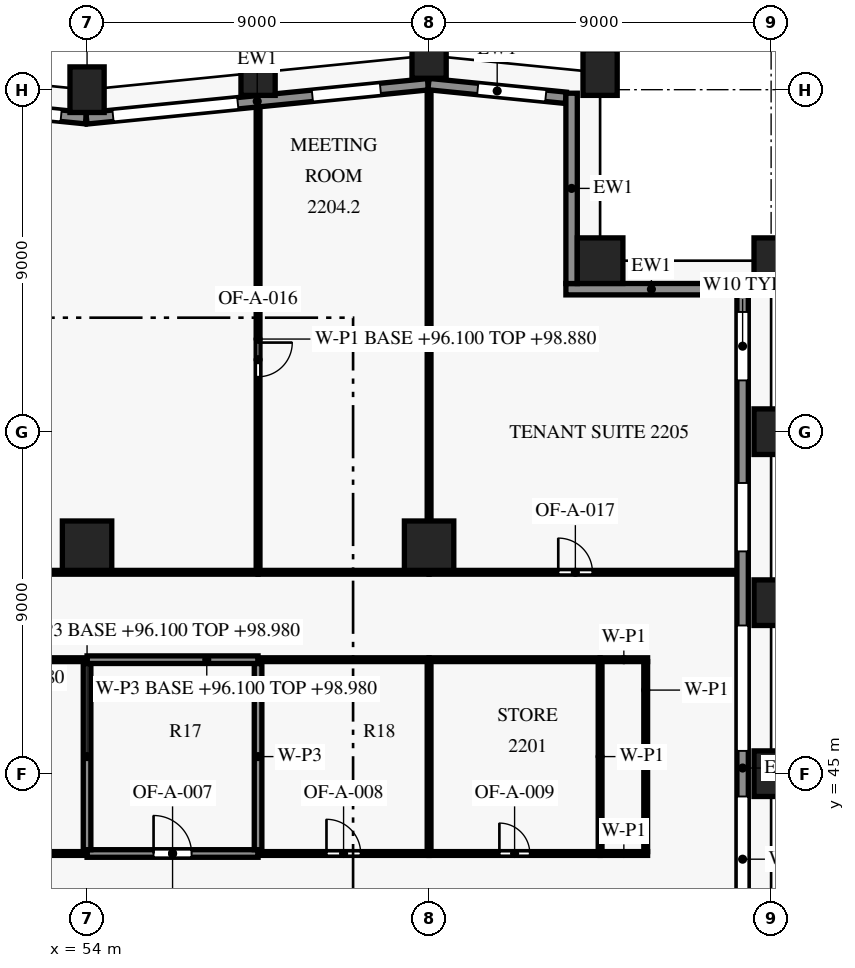
"""IFC4 building model, lengths in metres.
Left out: names, types, materials, properties, quantities, classifications, styles, units other than length and angle.
Written with IfcOpenShell. Run it as: python <this file> out.ifc"""

import sys

from ifc_helpers import new_model, si_unit, direction, frame, frame_2d, origin, origin_2d, place, context, subcontext, project, spatial, rectangle, extrude, element, fill, save


model = new_model("IFC4")
c1 = context("Model", 3, precision=1e-05, world=origin(), true_north=direction((0.0, 1.0)))
c2 = subcontext(c1, "Body", "Model", "MODEL_VIEW")
j1 = project(units=[si_unit("LENGTHUNIT", "METRE"), si_unit("PLANEANGLEUNIT", "RADIAN")], contexts=[c1])
p1 = place(None, origin())
s1 = spatial("IfcSite", under=j1, at=p1, CompositionType="ELEMENT")
p2 = place(p1, origin())
s2 = spatial("IfcBuilding", under=s1, at=p2, CompositionType="ELEMENT")
p3 = place(p2, frame((0.0, 0.0, 96.1)))
s3 = spatial("IfcBuildingStorey", under=s2, at=p3, CompositionType="ELEMENT", Elevation=96.1)
for number, where, z_axis, x_axis in (
    (1, (72.0, 45.0, 0.0), (0.0, 0.0, 1.0), (0.0, 1.0, 0.0)),
    (2, (72.0, 49.5, 0.0), (0.0, 0.0, 1.0), (0.0, 1.0, 0.0)),
    (3, (72.0, 54.0, 0.0), (0.0, 0.0, 1.0), (0.0, 1.0, 0.0)),
    (4, (72.0, 58.5, 0.0), (0.0, 0.0, 1.0), (0.0, 1.0, 0.0)),
    (5, (67.5, 63.45, 0.0), (0.0, 0.0, 1.0), (-0.995, 0.1, 0.0)),
    (6, (63.0, 63.9, 0.0), (0.0, 0.0, 1.0), (-1.0, 0.0, 0.0)),
    (7, (58.5, 63.45, 0.0), (0.0, 0.0, 1.0), (-0.995, -0.1, 0.0)),
    (8, (54.0, 63.0, 0.0), (0.0, 0.0, 1.0), (-1.0, 0.0, 0.0)),
):
    element("IfcColumn", number, at=place(p3, frame(where, z_axis=z_axis, x_axis=x_axis)), inside=s3, PredefinedType="COLUMN", context=c2, shape_type="SweptSolid", body=[
        extrude(rectangle(XDim=0.9, YDim=1.2, at=origin_2d()), origin(), (0.0, 0.0, 1.0), 3.8),
    ])
p4 = place(p3, frame((67.5, 58.5, 0.0), z_axis=(0.0, 0.0, 1.0), x_axis=(1.0, 0.0, 0.0)))
e9 = element("IfcColumn", 9, at=p4, inside=s3, PredefinedType="COLUMN", context=c2, shape_type="SweptSolid", body=[
    extrude(rectangle(XDim=1.2, YDim=1.2, at=origin_2d()), origin(), (0.0, 0.0, 1.0), 3.8),
])
for number, where, z_axis, x_axis in (
    (10, (54.0, 51.0, 0.0), (0.0, 0.0, 1.0), (1.0, 0.0, 0.0)),
    (11, (63.0, 51.0, 0.0), (0.0, 0.0, 1.0), (1.0, 0.0, 0.0)),
):
    element("IfcColumn", number, at=place(p3, frame(where, z_axis=z_axis, x_axis=x_axis)), inside=s3, PredefinedType="COLUMN", context=c2, shape_type="SweptSolid", body=[
        extrude(rectangle(XDim=1.3, YDim=1.3, at=origin_2d()), origin(), (0.0, 0.0, 1.0), 3.8),
    ])
p5 = place(p3, frame((71.25, 57.9, 0.0), z_axis=(0.0, 0.0, 1.0), x_axis=(0.0, -1.0, 0.0)))
e12 = element("IfcWall", 12, at=p5, inside=s3, PredefinedType="SOLIDWALL", context=c2, shape_type="SweptSolid", body=[
    extrude(rectangle(XDim=25.502, YDim=0.3, at=frame_2d((12.751, 0.0))), origin(), (0.0, 0.0, 1.0), 3.15),
])
p6 = place(p5, frame((0.75, 0.0, 0.75)))
e13 = element("IfcOpeningElement", 13, at=p6, cuts=e12, PredefinedType="OPENING", context=c2, shape_type="SweptSolid", body=[
    extrude(rectangle(XDim=1.8, YDim=1.8, at=frame_2d((0.9, 0.9))), frame((0.0, 0.16, 0.0), z_axis=(0.0, -1.0, 0.0), x_axis=(1.0, 0.0, 0.0)), (0.0, 0.0, 1.0), 0.32),
])
p7 = place(p5, frame((5.25, 0.0, 0.75)))
e14 = element("IfcOpeningElement", 14, at=p7, cuts=e12, PredefinedType="OPENING", context=c2, shape_type="SweptSolid", body=[
    extrude(rectangle(XDim=1.8, YDim=1.8, at=frame_2d((0.9, 0.9))), frame((0.0, 0.16, 0.0), z_axis=(0.0, -1.0, 0.0), x_axis=(1.0, 0.0, 0.0)), (0.0, 0.0, 1.0), 0.32),
])
p8 = place(p5, frame((9.0, 0.0, 0.15)))
e15 = element("IfcOpeningElement", 15, at=p8, cuts=e12, PredefinedType="OPENING", context=c2, shape_type="SweptSolid", body=[
    extrude(rectangle(XDim=3.3, YDim=2.4, at=frame_2d((1.65, 1.2))), frame((0.0, 0.16, 0.0), z_axis=(0.0, -1.0, 0.0), x_axis=(1.0, 0.0, 0.0)), (0.0, 0.0, 1.0), 0.32),
])
p9 = place(p5, frame((13.5, 0.0, 0.15)))
e16 = element("IfcOpeningElement", 16, at=p9, cuts=e12, PredefinedType="OPENING", context=c2, shape_type="SweptSolid", body=[
    extrude(rectangle(XDim=3.3, YDim=2.4, at=frame_2d((1.65, 1.2))), frame((0.0, 0.16, 0.0), z_axis=(0.0, -1.0, 0.0), x_axis=(1.0, 0.0, 0.0)), (0.0, 0.0, 1.0), 0.32),
])
p10 = place(p5, frame((18.75, 0.0, 0.75)))
e17 = element("IfcOpeningElement", 17, at=p10, cuts=e12, PredefinedType="OPENING", context=c2, shape_type="SweptSolid", body=[
    extrude(rectangle(XDim=1.8, YDim=1.8, at=frame_2d((0.9, 0.9))), frame((0.0, 0.16, 0.0), z_axis=(0.0, -1.0, 0.0), x_axis=(1.0, 0.0, 0.0)), (0.0, 0.0, 1.0), 0.32),
])
p11 = place(p5, frame((23.25, 0.0, 0.75)))
e18 = element("IfcOpeningElement", 18, at=p11, cuts=e12, PredefinedType="OPENING", context=c2, shape_type="SweptSolid", body=[
    extrude(rectangle(XDim=1.8, YDim=1.8, at=frame_2d((0.9, 0.9))), frame((0.0, 0.16, 0.0), z_axis=(0.0, -1.0, 0.0), x_axis=(1.0, 0.0, 0.0)), (0.0, 0.0, 1.0), 0.32),
])
p12 = place(p3, frame((66.6, 57.75, 0.0), z_axis=(0.0, 0.0, 1.0), x_axis=(1.0, 0.0, 0.0)))
e19 = element("IfcWall", 19, at=p12, inside=s3, PredefinedType="SOLIDWALL", context=c2, shape_type="SweptSolid", body=[
    extrude(rectangle(XDim=4.5, YDim=0.3, at=frame_2d((2.25, 0.0))), origin(), (0.0, 0.0, 1.0), 3.15),
])
p13 = place(p3, frame((66.75, 62.907, 0.0), z_axis=(0.0, 0.0, 1.0), x_axis=(0.0, -1.0, 0.0)))
e20 = element("IfcWall", 20, at=p13, inside=s3, PredefinedType="SOLIDWALL", context=c2, shape_type="SweptSolid", body=[
    extrude(rectangle(XDim=5.009, YDim=0.3, at=frame_2d((2.504, 0.0))), origin(), (0.0, 0.0, 1.0), 3.15),
])
p14 = place(p3, frame((62.985, 63.148, 0.0), z_axis=(0.0, 0.0, 1.0), x_axis=(0.995038521274, -0.099490407478, 0.0)))
e21 = element("IfcWall", 21, at=p14, inside=s3, PredefinedType="SOLIDWALL", context=c2, shape_type="SweptSolid", body=[
    extrude(rectangle(XDim=3.632, YDim=0.3, at=frame_2d((1.816, 0.0))), origin(), (0.0, 0.0, 1.0), 3.15),
])
p15 = place(p14, frame((1.301, 0.0, 0.75)))
e22 = element("IfcOpeningElement", 22, at=p15, cuts=e21, PredefinedType="OPENING", context=c2, shape_type="SweptSolid", body=[
    extrude(rectangle(XDim=1.8, YDim=1.8, at=frame_2d((0.9, 0.9))), frame((0.0, 0.16, 0.0), z_axis=(0.0, -1.0, 0.0), x_axis=(1.0, 0.0, 0.0)), (0.0, 0.0, 1.0), 0.32),
])
p16 = place(p3, frame((53.985, 62.245, 0.0), z_axis=(0.0, 0.0, 1.0), x_axis=(0.995037993253, 0.099495688264, 0.0)))
e23 = element("IfcWall", 23, at=p16, inside=s3, PredefinedType="SOLIDWALL", context=c2, shape_type="SweptSolid", body=[
    extrude(rectangle(XDim=9.03, YDim=0.3, at=frame_2d((4.515, 0.0))), origin(), (0.0, 0.0, 1.0), 3.15),
])
p17 = place(p16, frame((0.701, 0.0, 0.15)))
e24 = element("IfcOpeningElement", 24, at=p17, cuts=e23, PredefinedType="OPENING", context=c2, shape_type="SweptSolid", body=[
    extrude(rectangle(XDim=3.3, YDim=2.4, at=frame_2d((1.65, 1.2))), frame((0.0, 0.16, 0.0), z_axis=(0.0, -1.0, 0.0), x_axis=(1.0, 0.0, 0.0)), (0.0, 0.0, 1.0), 0.32),
])
p18 = place(p16, frame((5.974, 0.0, 0.75)))
e25 = element("IfcOpeningElement", 25, at=p18, cuts=e23, PredefinedType="OPENING", context=c2, shape_type="SweptSolid", body=[
    extrude(rectangle(XDim=1.8, YDim=1.8, at=frame_2d((0.9, 0.9))), frame((0.0, 0.16, 0.0), z_axis=(0.0, -1.0, 0.0), x_axis=(1.0, 0.0, 0.0)), (0.0, 0.0, 1.0), 0.32),
])
p19 = place(p3, frame((44.985, 63.148, 0.0), z_axis=(0.0, 0.0, 1.0), x_axis=(0.995037993253, -0.099495688264, 0.0)))
e26 = element("IfcWall", 26, at=p19, inside=s3, PredefinedType="SOLIDWALL", context=c2, shape_type="SweptSolid", body=[
    extrude(rectangle(XDim=9.03, YDim=0.3, at=frame_2d((4.515, 0.0))), origin(), (0.0, 0.0, 1.0), 3.15),
])
p20 = place(p19, frame((1.301, 0.0, 0.75)))
e27 = element("IfcOpeningElement", 27, at=p20, cuts=e26, PredefinedType="OPENING", context=c2, shape_type="SweptSolid", body=[
    extrude(rectangle(XDim=1.8, YDim=1.8, at=frame_2d((0.9, 0.9))), frame((0.0, 0.16, 0.0), z_axis=(0.0, -1.0, 0.0), x_axis=(1.0, 0.0, 0.0)), (0.0, 0.0, 1.0), 0.32),
])
p21 = place(p19, frame((5.073, 0.0, 0.15)))
e28 = element("IfcOpeningElement", 28, at=p21, cuts=e26, PredefinedType="OPENING", context=c2, shape_type="SweptSolid", body=[
    extrude(rectangle(XDim=3.3, YDim=2.4, at=frame_2d((1.65, 1.2))), frame((0.0, 0.16, 0.0), z_axis=(0.0, -1.0, 0.0), x_axis=(1.0, 0.0, 0.0)), (0.0, 0.0, 1.0), 0.32),
])
p22 = place(p3, frame((51.3, 42.9, 0.0), z_axis=(0.0, 0.0, 1.0), x_axis=(1.0, 0.0, 0.0)))
e29 = element("IfcWall", 29, at=p22, inside=s3, PredefinedType="PARTITIONING", context=c2, shape_type="SweptSolid", body=[
    extrude(rectangle(XDim=2.7, YDim=0.1, at=frame_2d((1.35, 0.0))), origin(), (0.0, 0.0, 1.0), 2.78),
])
p23 = place(p3, frame((54.0, 42.9, 0.0), z_axis=(0.0, 0.0, 1.0), x_axis=(1.0, 0.0, 0.0)))
e30 = element("IfcWall", 30, at=p23, inside=s3, PredefinedType="PARTITIONING", context=c2, shape_type="SweptSolid", body=[
    extrude(rectangle(XDim=4.5, YDim=0.2, at=frame_2d((2.25, 0.0))), origin(), (0.0, 0.0, 1.0), 2.88),
])
p24 = place(p23, frame((1.75, 0.0, 0.0)))
e31 = element("IfcOpeningElement", 31, at=p24, cuts=e30, PredefinedType="OPENING", context=c2, shape_type="SweptSolid", body=[
    extrude(rectangle(XDim=1.0, YDim=2.1, at=frame_2d((0.5, 1.05))), frame((0.0, 0.11, 0.0), z_axis=(0.0, -1.0, 0.0), x_axis=(1.0, 0.0, 0.0)), (0.0, 0.0, 1.0), 0.22),
])
p25 = place(p3, frame((58.5, 42.9, 0.0), z_axis=(0.0, 0.0, 1.0), x_axis=(1.0, 0.0, 0.0)))
e32 = element("IfcWall", 32, at=p25, inside=s3, PredefinedType="PARTITIONING", context=c2, shape_type="SweptSolid", body=[
    extrude(rectangle(XDim=4.5, YDim=0.1, at=frame_2d((2.25, 0.0))), origin(), (0.0, 0.0, 1.0), 2.88),
])
p26 = place(p25, frame((1.8, 0.0, 0.0)))
e33 = element("IfcOpeningElement", 33, at=p26, cuts=e32, PredefinedType="OPENING", context=c2, shape_type="SweptSolid", body=[
    extrude(rectangle(XDim=0.9, YDim=2.1, at=frame_2d((0.45, 1.05))), frame((0.0, 0.06, 0.0), z_axis=(0.0, -1.0, 0.0), x_axis=(1.0, 0.0, 0.0)), (0.0, 0.0, 1.0), 0.12),
])
p27 = place(p3, frame((63.0, 42.9, 0.0), z_axis=(0.0, 0.0, 1.0), x_axis=(1.0, 0.0, 0.0)))
e34 = element("IfcWall", 34, at=p27, inside=s3, PredefinedType="PARTITIONING", context=c2, shape_type="SweptSolid", body=[
    extrude(rectangle(XDim=4.5, YDim=0.1, at=frame_2d((2.25, 0.0))), origin(), (0.0, 0.0, 1.0), 2.88),
])
p28 = place(p27, frame((1.85, 0.0, 0.0)))
e35 = element("IfcOpeningElement", 35, at=p28, cuts=e34, PredefinedType="OPENING", context=c2, shape_type="SweptSolid", body=[
    extrude(rectangle(XDim=0.8, YDim=2.1, at=frame_2d((0.4, 1.05))), frame((0.0, 0.06, 0.0), z_axis=(0.0, -1.0, 0.0), x_axis=(1.0, 0.0, 0.0)), (0.0, 0.0, 1.0), 0.12),
])
p29 = place(p3, frame((67.5, 42.9, 0.0), z_axis=(0.0, 0.0, 1.0), x_axis=(1.0, 0.0, 0.0)))
e36 = element("IfcWall", 36, at=p29, inside=s3, PredefinedType="PARTITIONING", context=c2, shape_type="SweptSolid", body=[
    extrude(rectangle(XDim=1.25, YDim=0.1, at=frame_2d((0.625, 0.0))), origin(), (0.0, 0.0, 1.0), 3.48),
])
p30 = place(p3, frame((68.7, 42.95, 0.0), z_axis=(0.0, 0.0, 1.0), x_axis=(0.0, 1.0, 0.0)))
e37 = element("IfcWall", 37, at=p30, inside=s3, PredefinedType="PARTITIONING", context=c2, shape_type="SweptSolid", body=[
    extrude(rectangle(XDim=5.0, YDim=0.1, at=frame_2d((2.5, 0.0))), origin(), (0.0, 0.0, 1.0), 3.48),
])
p31 = place(p3, frame((54.0, 43.0, 0.0), z_axis=(0.0, 0.0, 1.0), x_axis=(0.0, 1.0, 0.0)))
e38 = element("IfcWall", 38, at=p31, inside=s3, PredefinedType="PARTITIONING", context=c2, shape_type="SweptSolid", body=[
    extrude(rectangle(XDim=4.9, YDim=0.2, at=frame_2d((2.45, 0.0))), origin(), (0.0, 0.0, 1.0), 2.88),
])
p32 = place(p3, frame((58.5, 47.9, 0.0), z_axis=(0.0, 0.0, 1.0), x_axis=(0.0, -1.0, 0.0)))
e39 = element("IfcWall", 39, at=p32, inside=s3, PredefinedType="PARTITIONING", context=c2, shape_type="SweptSolid", body=[
    extrude(rectangle(XDim=4.9, YDim=0.2, at=frame_2d((2.45, 0.0))), origin(), (0.0, 0.0, 1.0), 3.48),
])
p33 = place(p3, frame((63.0, 47.95, 0.0), z_axis=(0.0, 0.0, 1.0), x_axis=(0.0, -1.0, 0.0)))
e40 = element("IfcWall", 40, at=p33, inside=s3, PredefinedType="PARTITIONING", context=c2, shape_type="SweptSolid", body=[
    extrude(rectangle(XDim=5.0, YDim=0.1, at=frame_2d((2.5, 0.0))), origin(), (0.0, 0.0, 1.0), 2.88),
])
p34 = place(p3, frame((67.5, 47.95, 0.0), z_axis=(0.0, 0.0, 1.0), x_axis=(0.0, -1.0, 0.0)))
e41 = element("IfcWall", 41, at=p34, inside=s3, PredefinedType="PARTITIONING", context=c2, shape_type="SweptSolid", body=[
    extrude(rectangle(XDim=5.0, YDim=0.1, at=frame_2d((2.5, 0.0))), origin(), (0.0, 0.0, 1.0), 3.48),
])
p35 = place(p3, frame((54.0, 48.0, 0.0), z_axis=(0.0, 0.0, 1.0), x_axis=(-1.0, 0.0, 0.0)))
e42 = element("IfcWall", 42, at=p35, inside=s3, PredefinedType="PARTITIONING", context=c2, shape_type="SweptSolid", body=[
    extrude(rectangle(XDim=9.0, YDim=0.1, at=frame_2d((4.5, 0.0))), origin(), (0.0, 0.0, 1.0), 2.88),
])
p36 = place(p3, frame((58.5, 48.0, 0.0), z_axis=(0.0, 0.0, 1.0), x_axis=(-1.0, 0.0, 0.0)))
e43 = element("IfcWall", 43, at=p36, inside=s3, PredefinedType="PARTITIONING", context=c2, shape_type="SweptSolid", body=[
    extrude(rectangle(XDim=4.5, YDim=0.2, at=frame_2d((2.25, 0.0))), origin(), (0.0, 0.0, 1.0), 2.88),
])
for number, where, z_axis, x_axis in (
    (44, (63.0, 48.0, 0.0), (0.0, 0.0, 1.0), (-1.0, 0.0, 0.0)),
    (45, (67.5, 48.0, 0.0), (0.0, 0.0, 1.0), (-1.0, 0.0, 0.0)),
):
    element("IfcWall", number, at=place(p3, frame(where, z_axis=z_axis, x_axis=x_axis)), inside=s3, PredefinedType="PARTITIONING", context=c2, shape_type="SweptSolid", body=[
        extrude(rectangle(XDim=4.5, YDim=0.1, at=frame_2d((2.25, 0.0))), origin(), (0.0, 0.0, 1.0), 2.88),
    ])
p37 = place(p3, frame((68.75, 48.0, 0.0), z_axis=(0.0, 0.0, 1.0), x_axis=(-1.0, 0.0, 0.0)))
e46 = element("IfcWall", 46, at=p37, inside=s3, PredefinedType="PARTITIONING", context=c2, shape_type="SweptSolid", body=[
    extrude(rectangle(XDim=1.25, YDim=0.1, at=frame_2d((0.625, 0.0))), origin(), (0.0, 0.0, 1.0), 3.48),
])
p38 = place(p3, frame((45.0, 50.3, 0.0), z_axis=(0.0, 0.0, 1.0), x_axis=(1.0, 0.0, 0.0)))
e47 = element("IfcWall", 47, at=p38, inside=s3, PredefinedType="PARTITIONING", context=c2, shape_type="SweptSolid", body=[
    extrude(rectangle(XDim=13.5, YDim=0.1, at=frame_2d((6.75, 0.0))), origin(), (0.0, 0.0, 1.0), 2.88),
])
p39 = place(p38, frame((4.05, 0.0, 0.0)))
e48 = element("IfcOpeningElement", 48, at=p39, cuts=e47, PredefinedType="OPENING", context=c2, shape_type="SweptSolid", body=[
    extrude(rectangle(XDim=0.9, YDim=2.1, at=frame_2d((0.45, 1.05))), frame((0.0, 0.06, 0.0), z_axis=(0.0, -1.0, 0.0), x_axis=(1.0, 0.0, 0.0)), (0.0, 0.0, 1.0), 0.12),
])
p40 = place(p3, frame((58.5, 50.3, 0.0), z_axis=(0.0, 0.0, 1.0), x_axis=(1.0, 0.0, 0.0)))
e49 = element("IfcWall", 49, at=p40, inside=s3, PredefinedType="PARTITIONING", context=c2, shape_type="SweptSolid", body=[
    extrude(rectangle(XDim=4.5, YDim=0.1, at=frame_2d((2.25, 0.0))), origin(), (0.0, 0.0, 1.0), 2.88),
])
p41 = place(p3, frame((63.0, 50.3, 0.0), z_axis=(0.0, 0.0, 1.0), x_axis=(1.0, 0.0, 0.0)))
e50 = element("IfcWall", 50, at=p41, inside=s3, PredefinedType="PARTITIONING", context=c2, shape_type="SweptSolid", body=[
    extrude(rectangle(XDim=8.08, YDim=0.1, at=frame_2d((4.04, 0.0))), origin(), (0.0, 0.0, 1.0), 2.88),
])
p42 = place(p41, frame((3.399, 0.0, 0.0)))
e51 = element("IfcOpeningElement", 51, at=p42, cuts=e50, PredefinedType="OPENING", context=c2, shape_type="SweptSolid", body=[
    extrude(rectangle(XDim=0.9, YDim=2.1, at=frame_2d((0.45, 1.05))), frame((0.0, 0.06, 0.0), z_axis=(0.0, -1.0, 0.0), x_axis=(1.0, 0.0, 0.0)), (0.0, 0.0, 1.0), 0.12),
])
p43 = place(p3, frame((58.5, 62.525, 0.0), z_axis=(0.0, 0.0, 1.0), x_axis=(0.0, -1.0, 0.0)))
e52 = element("IfcWall", 52, at=p43, inside=s3, PredefinedType="PARTITIONING", context=c2, shape_type="SweptSolid", body=[
    extrude(rectangle(XDim=12.175, YDim=0.1, at=frame_2d((6.088, 0.0))), origin(), (0.0, 0.0, 1.0), 2.78),
])
p44 = place(p43, frame((6.18, 0.0, 0.0)))
e53 = element("IfcOpeningElement", 53, at=p44, cuts=e52, PredefinedType="OPENING", context=c2, shape_type="SweptSolid", body=[
    extrude(rectangle(XDim=0.9, YDim=2.1, at=frame_2d((0.45, 1.05))), frame((0.0, 0.06, 0.0), z_axis=(0.0, -1.0, 0.0), x_axis=(1.0, 0.0, 0.0)), (0.0, 0.0, 1.0), 0.12),
])
p45 = place(p3, frame((63.0, 62.976, 0.0), z_axis=(0.0, 0.0, 1.0), x_axis=(0.0, -1.0, 0.0)))
e54 = element("IfcWall", 54, at=p45, inside=s3, PredefinedType="PARTITIONING", context=c2, shape_type="SweptSolid", body=[
    extrude(rectangle(XDim=11.321, YDim=0.1, at=frame_2d((5.66, 0.0))), origin(), (0.0, 0.0, 1.0), 2.88),
])
p46 = place(p6, origin())
e55 = element("IfcWindow", 55, at=p46, inside=s3, PartitioningType="SINGLE_PANEL", PredefinedType="WINDOW", context=c2, shape_type="SweptSolid", body=[
    extrude(rectangle(XDim=1.8, YDim=1.8, at=frame_2d((0.9, 0.9))), frame((0.0, 0.03, 0.0), z_axis=(0.0, -1.0, 0.0), x_axis=(1.0, 0.0, 0.0)), (0.0, 0.0, 1.0), 0.06),
])
fill(e13, e55)
p47 = place(p7, origin())
e56 = element("IfcWindow", 56, at=p47, inside=s3, PartitioningType="SINGLE_PANEL", PredefinedType="WINDOW", context=c2, shape_type="SweptSolid", body=[
    extrude(rectangle(XDim=1.8, YDim=1.8, at=frame_2d((0.9, 0.9))), frame((0.0, 0.03, 0.0), z_axis=(0.0, -1.0, 0.0), x_axis=(1.0, 0.0, 0.0)), (0.0, 0.0, 1.0), 0.06),
])
fill(e14, e56)
p48 = place(p8, origin())
e57 = element("IfcWindow", 57, at=p48, inside=s3, PartitioningType="SINGLE_PANEL", PredefinedType="WINDOW", context=c2, shape_type="SweptSolid", body=[
    extrude(rectangle(XDim=3.3, YDim=2.4, at=frame_2d((1.65, 1.2))), frame((0.0, 0.03, 0.0), z_axis=(0.0, -1.0, 0.0), x_axis=(1.0, 0.0, 0.0)), (0.0, 0.0, 1.0), 0.06),
])
fill(e15, e57)
p49 = place(p9, origin())
e58 = element("IfcWindow", 58, at=p49, inside=s3, PartitioningType="SINGLE_PANEL", PredefinedType="WINDOW", context=c2, shape_type="SweptSolid", body=[
    extrude(rectangle(XDim=3.3, YDim=2.4, at=frame_2d((1.65, 1.2))), frame((0.0, 0.03, 0.0), z_axis=(0.0, -1.0, 0.0), x_axis=(1.0, 0.0, 0.0)), (0.0, 0.0, 1.0), 0.06),
])
fill(e16, e58)
p50 = place(p15, origin())
e59 = element("IfcWindow", 59, at=p50, inside=s3, PartitioningType="SINGLE_PANEL", PredefinedType="WINDOW", context=c2, shape_type="SweptSolid", body=[
    extrude(rectangle(XDim=1.8, YDim=1.8, at=frame_2d((0.9, 0.9))), frame((0.0, 0.03, 0.0), z_axis=(0.0, -1.0, 0.0), x_axis=(1.0, 0.0, 0.0)), (0.0, 0.0, 1.0), 0.06),
])
fill(e22, e59)
p51 = place(p17, origin())
e60 = element("IfcWindow", 60, at=p51, inside=s3, PartitioningType="SINGLE_PANEL", PredefinedType="WINDOW", context=c2, shape_type="SweptSolid", body=[
    extrude(rectangle(XDim=3.3, YDim=2.4, at=frame_2d((1.65, 1.2))), frame((0.0, 0.03, 0.0), z_axis=(0.0, -1.0, 0.0), x_axis=(1.0, 0.0, 0.0)), (0.0, 0.0, 1.0), 0.06),
])
fill(e24, e60)
p52 = place(p18, origin())
e61 = element("IfcWindow", 61, at=p52, inside=s3, PartitioningType="SINGLE_PANEL", PredefinedType="WINDOW", context=c2, shape_type="SweptSolid", body=[
    extrude(rectangle(XDim=1.8, YDim=1.8, at=frame_2d((0.9, 0.9))), frame((0.0, 0.03, 0.0), z_axis=(0.0, -1.0, 0.0), x_axis=(1.0, 0.0, 0.0)), (0.0, 0.0, 1.0), 0.06),
])
fill(e25, e61)
p53 = place(p21, origin())
e62 = element("IfcWindow", 62, at=p53, inside=s3, PartitioningType="SINGLE_PANEL", PredefinedType="WINDOW", context=c2, shape_type="SweptSolid", body=[
    extrude(rectangle(XDim=3.3, YDim=2.4, at=frame_2d((1.65, 1.2))), frame((0.0, 0.03, 0.0), z_axis=(0.0, -1.0, 0.0), x_axis=(1.0, 0.0, 0.0)), (0.0, 0.0, 1.0), 0.06),
])
fill(e28, e62)
p54 = place(p24, origin())
e63 = element("IfcDoor", 63, at=p54, inside=s3, OperationType="SINGLE_SWING_RIGHT", PredefinedType="DOOR", context=c2, shape_type="SweptSolid", body=[
    extrude(rectangle(XDim=1.0, YDim=2.1, at=frame_2d((0.5, 1.05))), frame((0.0, 0.025, 0.0), z_axis=(0.0, -1.0, 0.0), x_axis=(1.0, 0.0, 0.0)), (0.0, 0.0, 1.0), 0.05),
])
fill(e31, e63)
p55 = place(p26, origin())
e64 = element("IfcDoor", 64, at=p55, inside=s3, OperationType="SINGLE_SWING_LEFT", PredefinedType="DOOR", context=c2, shape_type="SweptSolid", body=[
    extrude(rectangle(XDim=0.9, YDim=2.1, at=frame_2d((0.45, 1.05))), frame((0.0, 0.025, 0.0), z_axis=(0.0, -1.0, 0.0), x_axis=(1.0, 0.0, 0.0)), (0.0, 0.0, 1.0), 0.05),
])
fill(e33, e64)
p56 = place(p28, origin())
e65 = element("IfcDoor", 65, at=p56, inside=s3, OperationType="SINGLE_SWING_RIGHT", PredefinedType="DOOR", context=c2, shape_type="SweptSolid", body=[
    extrude(rectangle(XDim=0.8, YDim=2.1, at=frame_2d((0.4, 1.05))), frame((0.0, 0.025, 0.0), z_axis=(0.0, -1.0, 0.0), x_axis=(1.0, 0.0, 0.0)), (0.0, 0.0, 1.0), 0.05),
])
fill(e35, e65)
p57 = place(p44, origin())
e66 = element("IfcDoor", 66, at=p57, inside=s3, OperationType="SINGLE_SWING_LEFT", PredefinedType="DOOR", context=c2, shape_type="SweptSolid", body=[
    extrude(rectangle(XDim=0.9, YDim=2.1, at=frame_2d((0.45, 1.05))), frame((0.0, 0.025, 0.0), z_axis=(0.0, -1.0, 0.0), x_axis=(1.0, 0.0, 0.0)), (0.0, 0.0, 1.0), 0.05),
])
fill(e53, e66)
p58 = place(p42, origin())
e67 = element("IfcDoor", 67, at=p58, inside=s3, OperationType="SINGLE_SWING_LEFT", PredefinedType="DOOR", context=c2, shape_type="SweptSolid", body=[
    extrude(rectangle(XDim=0.9, YDim=2.1, at=frame_2d((0.45, 1.05))), frame((0.0, 0.025, 0.0), z_axis=(0.0, -1.0, 0.0), x_axis=(1.0, 0.0, 0.0)), (0.0, 0.0, 1.0), 0.05),
])
fill(e51, e67)
save(model, sys.argv[1])
